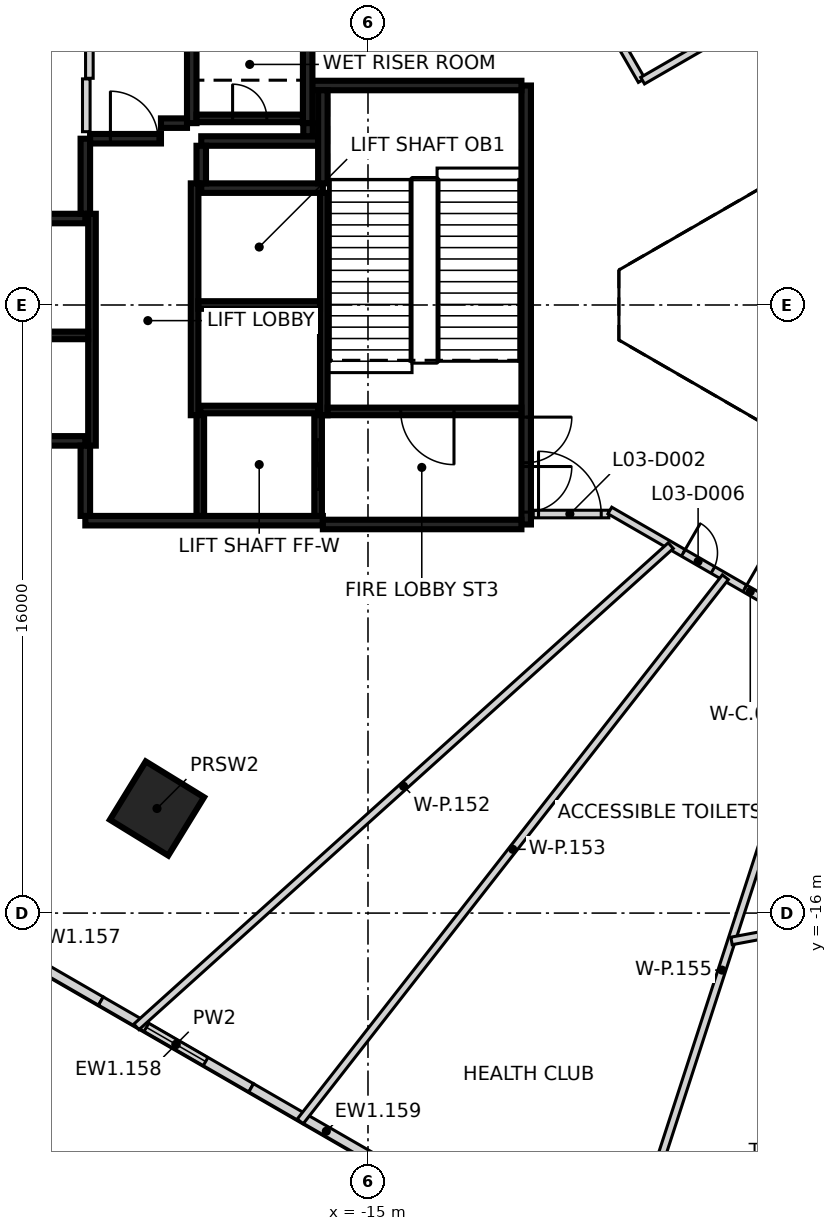
"""IFC4 building model, lengths in metres.
Left out: names, types, materials, properties, quantities, classifications, styles, units other than length and angle.
Written with IfcOpenShell. Run it as: python <this file> out.ifc"""

import sys

from ifc_helpers import new_model, si_unit, direction, frame, frame_2d, origin, origin_2d, place, context, subcontext, project, spatial, rectangle, extrude, element, fill, save


model = new_model("IFC4")
c1 = context("Model", 3, precision=1e-05, world=origin(), true_north=direction((0.0, 1.0)))
c2 = subcontext(c1, "Body", "Model", "MODEL_VIEW")
j1 = project(units=[si_unit("LENGTHUNIT", "METRE"), si_unit("PLANEANGLEUNIT", "RADIAN")], contexts=[c1])
p1 = place(None, origin())
s1 = spatial("IfcSite", under=j1, at=p1, CompositionType="ELEMENT")
p2 = place(p1, origin())
s2 = spatial("IfcBuilding", under=s1, at=p2, CompositionType="ELEMENT")
p3 = place(p2, frame((0.0, 0.0, 19.5)))
s3 = spatial("IfcBuildingStorey", under=s2, at=p3, CompositionType="ELEMENT", Elevation=19.5)
p4 = place(p3, frame((-20.552, -13.248, -0.35), z_axis=(0.0, 0.0, 1.0), x_axis=(0.523429826947, 0.85206878611, 0.0)))
e1 = element("IfcColumn", 1, at=p4, inside=s3, PredefinedType="COLUMN", context=c2, shape_type="SweptSolid", body=[
    extrude(rectangle(XDim=1.8, YDim=1.8, at=origin_2d()), origin(), (0.0, 0.0, 1.0), 2.5),
])
p5 = place(p3, frame((-22.028, -18.314, 0.0), z_axis=(0.0, 0.0, 1.0), x_axis=(-0.866023543838, 0.500003221507, 0.0)))
e2 = element("IfcWall", 2, at=p5, inside=s3, PredefinedType="SOLIDWALL", context=c2, shape_type="SweptSolid", body=[
    extrude(rectangle(XDim=4.566, YDim=0.25, at=frame_2d((2.283, 0.0))), origin(), (0.0, 0.0, 1.0), 4.55),
])
p6 = place(p3, frame((-18.074, -20.598, 0.0), z_axis=(0.0, 0.0, 1.0), x_axis=(-0.866010176527, 0.500026373457, 0.0)))
e3 = element("IfcWall", 3, at=p6, inside=s3, PredefinedType="SOLIDWALL", context=c2, shape_type="SweptSolid", body=[
    extrude(rectangle(XDim=4.566, YDim=0.25, at=frame_2d((2.283, 0.0))), origin(), (0.0, 0.0, 1.0), 4.55),
])
p7 = place(p6, frame((1.383, 0.0, 1.1)))
e4 = element("IfcOpeningElement", 4, at=p7, cuts=e3, PredefinedType="OPENING", context=c2, shape_type="SweptSolid", body=[
    extrude(rectangle(XDim=1.8, YDim=1.5, at=frame_2d((0.9, 0.75))), frame((0.0, 0.135, 0.0), z_axis=(0.0, -1.0, 0.0), x_axis=(1.0, 0.0, 0.0)), (0.0, 0.0, 1.0), 0.27),
])
p8 = place(p3, frame((-14.119, -22.881, 0.0), z_axis=(0.0, 0.0, 1.0), x_axis=(-0.866023543838, 0.500003221507, 0.0)))
e5 = element("IfcWall", 5, at=p8, inside=s3, PredefinedType="SOLIDWALL", context=c2, shape_type="SweptSolid", body=[
    extrude(rectangle(XDim=4.566, YDim=0.25, at=frame_2d((2.283, 0.0))), origin(), (0.0, 0.0, 1.0), 4.55),
])
p9 = place(p3, frame((-10.837, 5.775, 0.0), z_axis=(0.0, 0.0, 1.0), x_axis=(0.0, -1.0, 0.0)))
e6 = element("IfcWall", 6, at=p9, inside=s3, PredefinedType="SHEAR", context=c2, shape_type="SweptSolid", body=[
    extrude(rectangle(XDim=11.55, YDim=0.25, at=frame_2d((5.775, 0.0))), origin(), (0.0, 0.0, 1.0), 4.55),
])
p10 = place(p9, frame((10.025, 0.0, 0.0)))
e7 = element("IfcOpeningElement", 7, at=p10, cuts=e6, PredefinedType="OPENING", context=c2, shape_type="SweptSolid", body=[
    extrude(rectangle(XDim=1.2, YDim=2.1, at=frame_2d((0.6, 1.05))), frame((0.0, 0.135, 0.0), z_axis=(0.0, -1.0, 0.0), x_axis=(1.0, 0.0, 0.0)), (0.0, 0.0, 1.0), 0.27),
])
p11 = place(p9, frame((8.725, 0.0, 0.0)))
e8 = element("IfcOpeningElement", 8, at=p11, cuts=e6, PredefinedType="OPENING", context=c2, shape_type="SweptSolid", body=[
    extrude(rectangle(XDim=1.2, YDim=2.1, at=frame_2d((0.6, 1.05))), frame((0.0, 0.135, 0.0), z_axis=(0.0, -1.0, 0.0), x_axis=(1.0, 0.0, 0.0)), (0.0, 0.0, 1.0), 0.27),
])
p12 = place(p3, frame((-16.187, -5.675, 0.0), z_axis=(0.0, 0.0, 1.0), x_axis=(-1.0, 0.0, 0.0)))
e9 = element("IfcWall", 9, at=p12, inside=s3, PredefinedType="SHEAR", context=c2, shape_type="SweptSolid", body=[
    extrude(rectangle(XDim=6.25, YDim=0.25, at=frame_2d((3.125, 0.0))), origin(), (0.0, 0.0, 1.0), 4.55),
])
p13 = place(p3, frame((-10.963, -5.775, 0.0), z_axis=(0.0, 0.0, 1.0), x_axis=(-1.0, 0.0, 0.0)))
e10 = element("IfcWall", 10, at=p13, inside=s3, PredefinedType="SHEAR", context=c2, shape_type="SweptSolid", body=[
    extrude(rectangle(XDim=5.225, YDim=0.25, at=frame_2d((2.612, 0.0))), origin(), (0.0, 0.0, 1.0), 4.55),
])
p14 = place(p3, frame((-16.472, 5.775, 0.0), z_axis=(0.0, 0.0, 1.0), x_axis=(1.0, 0.0, 0.0)))
e11 = element("IfcWall", 11, at=p14, inside=s3, PredefinedType="SHEAR", context=c2, shape_type="SweptSolid", body=[
    extrude(rectangle(XDim=5.51, YDim=0.25, at=frame_2d((2.755, 0.0))), origin(), (0.0, 0.0, 1.0), 4.55),
])
p15 = place(p3, frame((-19.387, 3.075, 0.0), z_axis=(0.0, 0.0, 1.0), x_axis=(1.0, 0.0, 0.0)))
e12 = element("IfcWall", 12, at=p15, inside=s3, PredefinedType="SHEAR", context=c2, shape_type="SweptSolid", body=[
    extrude(rectangle(XDim=3.2, YDim=0.25, at=frame_2d((1.6, 0.0))), origin(), (0.0, 0.0, 1.0), 4.55),
])
for number, where, z_axis, x_axis in (
    (13, (-22.437, -3.575, 0.0), (0.0, 0.0, 1.0), (-1.0, 0.0, 0.0)),
    (14, (-25.412, 2.275, 0.0), (0.0, 0.0, 1.0), (1.0, 0.0, 0.0)),
):
    element("IfcWall", number, at=place(p3, frame(where, z_axis=z_axis, x_axis=x_axis)), inside=s3, PredefinedType="SHEAR", context=c2, shape_type="SweptSolid", body=[
        extrude(rectangle(XDim=2.975, YDim=0.25, at=frame_2d((1.487, 0.0))), origin(), (0.0, 0.0, 1.0), 4.55),
    ])
for number, where, z_axis, x_axis in (
    (15, (-16.587, 7.65, 0.0), (0.0, 0.0, 1.0), (0.0, -1.0, 0.0)),
    (16, (-19.637, 4.785, 0.0), (0.0, 0.0, 1.0), (0.0, 1.0, 0.0)),
):
    element("IfcWall", number, at=place(p3, frame(where, z_axis=z_axis, x_axis=x_axis)), inside=s3, PredefinedType="SHEAR", context=c2, shape_type="SweptSolid", body=[
        extrude(rectangle(XDim=2.865, YDim=0.25, at=frame_2d((1.432, 0.0))), origin(), (0.0, 0.0, 1.0), 4.55),
    ])
p16 = place(p3, frame((-16.302, 4.315, 0.0), z_axis=(0.0, 0.0, 1.0), x_axis=(-1.0, 0.0, 0.0)))
e17 = element("IfcWall", 17, at=p16, inside=s3, PredefinedType="SHEAR", context=c2, shape_type="SweptSolid", body=[
    extrude(rectangle(XDim=3.085, YDim=0.25, at=frame_2d((1.542, 0.0))), origin(), (0.0, 0.0, 1.0), 4.55),
])
p17 = place(p3, frame((-16.187, 3.2, 0.0), z_axis=(0.0, 0.0, 1.0), x_axis=(0.0, 1.0, 0.0)))
e18 = element("IfcWall", 18, at=p17, inside=s3, PredefinedType="SHEAR", context=c2, shape_type="SweptSolid", body=[
    extrude(rectangle(XDim=2.449, YDim=0.25, at=frame_2d((1.225, 0.0))), origin(), (0.0, 0.0, 1.0), 4.55),
])
p18 = place(p3, frame((-22.437, 2.4, 0.0), z_axis=(0.0, 0.0, 1.0), x_axis=(0.0, 1.0, 0.0)))
e19 = element("IfcWall", 19, at=p18, inside=s3, PredefinedType="SHEAR", context=c2, shape_type="SweptSolid", body=[
    extrude(rectangle(XDim=1.975, YDim=0.25, at=frame_2d((0.987, 0.0))), origin(), (0.0, 0.0, 1.0), 4.55),
])
p19 = place(p3, frame((-22.437, -5.55, 0.0), z_axis=(0.0, 0.0, 1.0), x_axis=(0.0, 1.0, 0.0)))
e20 = element("IfcWall", 20, at=p19, inside=s3, PredefinedType="SHEAR", context=c2, shape_type="SweptSolid", body=[
    extrude(rectangle(XDim=1.849, YDim=0.25, at=frame_2d((0.925, 0.0))), origin(), (0.0, 0.0, 1.0), 4.55),
])
p20 = place(p3, frame((-22.312, 4.375, 0.0), z_axis=(0.0, 0.0, 1.0), x_axis=(1.0, 0.0, 0.0)))
e21 = element("IfcWall", 21, at=p20, inside=s3, PredefinedType="SHEAR", context=c2, shape_type="SweptSolid", body=[
    extrude(rectangle(XDim=1.865, YDim=0.25, at=frame_2d((0.932, 0.0))), origin(), (0.0, 0.0, 1.0), 4.55),
])
p21 = place(p20, frame((0.535, 0.0, 0.0)))
e22 = element("IfcOpeningElement", 22, at=p21, cuts=e21, PredefinedType="OPENING", context=c2, shape_type="SweptSolid", body=[
    extrude(rectangle(XDim=1.25, YDim=2.1, at=frame_2d((0.625, 1.05))), frame((0.0, 0.135, 0.0), z_axis=(0.0, -1.0, 0.0), x_axis=(1.0, 0.0, 0.0)), (0.0, 0.0, 1.0), 0.27),
])
p22 = place(p3, frame((-19.387, 4.19, 0.0), z_axis=(0.0, 0.0, 1.0), x_axis=(0.0, -1.0, 0.0)))
e23 = element("IfcWall", 23, at=p22, inside=s3, PredefinedType="SHEAR", context=c2, shape_type="SweptSolid", body=[
    extrude(rectangle(XDim=0.989, YDim=0.25, at=frame_2d((0.495, 0.0))), origin(), (0.0, 0.0, 1.0), 4.55),
])
p23 = place(p3, frame((-20.447, 4.785, 0.0), z_axis=(0.0, 0.0, 1.0), x_axis=(1.0, 0.0, 0.0)))
e24 = element("IfcWall", 24, at=p23, inside=s3, PredefinedType="SHEAR", context=c2, shape_type="SweptSolid", body=[
    extrude(rectangle(XDim=0.685, YDim=0.25, at=frame_2d((0.342, 0.0))), origin(), (0.0, 0.0, 1.0), 4.55),
])
p24 = place(p3, frame((-16.577, 4.785, 0.0), z_axis=(0.0, 0.0, 1.0), x_axis=(0.0, -1.0, 0.0)))
e25 = element("IfcWall", 25, at=p24, inside=s3, PredefinedType="SHEAR", context=c2, shape_type="SweptSolid", body=[
    extrude(rectangle(XDim=0.344, YDim=0.25, at=frame_2d((0.172, 0.0))), origin(), (0.0, 0.0, 1.0), 4.55),
])
p25 = place(p3, frame((-16.162, 2.951, 0.0), z_axis=(0.0, 0.0, 1.0), x_axis=(0.0, -1.0, 0.0)))
e26 = element("IfcWall", 26, at=p25, inside=s3, PredefinedType="SHEAR", context=c2, shape_type="SweptSolid", body=[
    extrude(rectangle(XDim=5.851, YDim=0.2, at=frame_2d((2.925, 0.0))), origin(), (0.0, 0.0, 1.0), 4.55),
])
for number, where, z_axis, x_axis in (
    (27, (-19.562, -2.9, 0.0), (0.0, 0.0, 1.0), (0.0, 1.0, 0.0)),
    (28, (-22.262, 2.4, 0.0), (0.0, 0.0, 1.0), (0.0, -1.0, 0.0)),
):
    element("IfcWall", number, at=place(p3, frame(where, z_axis=z_axis, x_axis=x_axis)), inside=s3, PredefinedType="SHEAR", context=c2, shape_type="SweptSolid", body=[
        extrude(rectangle(XDim=6.1, YDim=0.2, at=frame_2d((3.05, 0.0))), origin(), (0.0, 0.0, 1.0), 4.55),
    ])
p26 = place(p3, frame((-10.963, -2.8, 0.0), z_axis=(0.0, 0.0, 1.0), x_axis=(-1.0, 0.0, 0.0)))
e29 = element("IfcWall", 29, at=p26, inside=s3, PredefinedType="SHEAR", context=c2, shape_type="SweptSolid", body=[
    extrude(rectangle(XDim=5.098, YDim=0.2, at=frame_2d((2.549, 0.0))), origin(), (0.0, 0.0, 1.0), 4.55),
])
p27 = place(p26, frame((1.774, 0.0, 0.0)))
e30 = element("IfcOpeningElement", 30, at=p27, cuts=e29, PredefinedType="OPENING", context=c2, shape_type="SweptSolid", body=[
    extrude(rectangle(XDim=1.4, YDim=2.1, at=frame_2d((0.7, 1.05))), frame((0.0, 0.11, 0.0), z_axis=(0.0, -1.0, 0.0), x_axis=(1.0, 0.0, 0.0)), (0.0, 0.0, 1.0), 0.22),
])
p28 = place(p3, frame((-16.263, 0.0, 0.0), z_axis=(0.0, 0.0, 1.0), x_axis=(-1.0, 0.0, 0.0)))
e31 = element("IfcWall", 31, at=p28, inside=s3, PredefinedType="SHEAR", context=c2, shape_type="SweptSolid", body=[
    extrude(rectangle(XDim=3.198, YDim=0.2, at=frame_2d((1.599, 0.0))), origin(), (0.0, 0.0, 1.0), 4.55),
])
p29 = place(p3, frame((-22.363, -0.8, 0.0), z_axis=(0.0, 0.0, 1.0), x_axis=(-1.0, 0.0, 0.0)))
e32 = element("IfcWall", 32, at=p29, inside=s3, PredefinedType="SHEAR", context=c2, shape_type="SweptSolid", body=[
    extrude(rectangle(XDim=3.048, YDim=0.2, at=frame_2d((1.524, 0.0))), origin(), (0.0, 0.0, 1.0), 4.55),
])
p30 = place(p3, frame((-19.511, 4.91, 0.0), z_axis=(0.0, 0.0, 1.0), x_axis=(1.0, 0.0, 0.0)))
e33 = element("IfcWall", 33, at=p30, inside=s3, PredefinedType="SHEAR", context=c2, shape_type="SweptSolid", body=[
    extrude(rectangle(XDim=2.798, YDim=0.2, at=frame_2d((1.399, 0.0))), origin(), (0.0, 0.0, 1.0), 4.55),
])
p31 = place(p30, frame((0.949, 0.0, 0.0)))
e34 = element("IfcOpeningElement", 34, at=p31, cuts=e33, PredefinedType="OPENING", context=c2, shape_type="SweptSolid", body=[
    extrude(rectangle(XDim=0.9, YDim=2.1, at=frame_2d((0.45, 1.05))), frame((0.0, 0.11, 0.0), z_axis=(0.0, -1.0, 0.0), x_axis=(1.0, 0.0, 0.0)), (0.0, 0.0, 1.0), 0.22),
])
p32 = place(p3, frame((-19.412, -2.75, 0.0), z_axis=(0.0, 0.0, 1.0), x_axis=(1.0, 0.0, 0.0)))
e35 = element("IfcWall", 35, at=p32, inside=s3, PredefinedType="SHEAR", context=c2, shape_type="SweptSolid", body=[
    extrude(rectangle(XDim=3.1, YDim=0.2, at=frame_2d((1.55, 0.0))), origin(), (0.0, 0.0, 1.0), 4.55),
])
p33 = place(p3, frame((-16.312, -2.898, 0.0), z_axis=(0.0, 0.0, 1.0), x_axis=(0.0, -1.0, 0.0)))
e36 = element("IfcWall", 36, at=p33, inside=s3, PredefinedType="SHEAR", context=c2, shape_type="SweptSolid", body=[
    extrude(rectangle(XDim=2.651, YDim=0.2, at=frame_2d((1.325, 0.0))), origin(), (0.0, 0.0, 1.0), 4.55),
])
p34 = place(p33, frame((0.652, 0.0, 0.0)))
e37 = element("IfcOpeningElement", 37, at=p34, cuts=e36, PredefinedType="OPENING", context=c2, shape_type="SweptSolid", body=[
    extrude(rectangle(XDim=1.3, YDim=2.1, at=frame_2d((0.65, 1.05))), frame((0.0, 0.11, 0.0), z_axis=(0.0, -1.0, 0.0), x_axis=(1.0, 0.0, 0.0)), (0.0, 0.0, 1.0), 0.22),
])
p35 = place(p3, frame((-19.412, -5.549, 0.0), z_axis=(0.0, 0.0, 1.0), x_axis=(0.0, 1.0, 0.0)))
e38 = element("IfcWall", 38, at=p35, inside=s3, PredefinedType="SHEAR", context=c2, shape_type="SweptSolid", body=[
    extrude(rectangle(XDim=2.651, YDim=0.2, at=frame_2d((1.325, 0.0))), origin(), (0.0, 0.0, 1.0), 4.55),
])
p36 = place(p3, frame((-22.412, 4.56, 0.0), z_axis=(0.0, 0.0, 1.0), x_axis=(0.0, 1.0, 0.0)))
e39 = element("IfcWall", 39, at=p36, inside=s3, PredefinedType="PARTITIONING", context=c2, shape_type="SweptSolid", body=[
    extrude(rectangle(XDim=1.389, YDim=0.2, at=frame_2d((0.694, 0.0))), origin(), (0.0, 0.0, 1.0), 4.55),
])
p37 = place(p3, frame((-22.332, 8.156, 0.0), z_axis=(0.0, 0.0, 1.0), x_axis=(0.000445732071, -0.999999900661, 0.0)))
e40 = element("IfcWall", 40, at=p37, inside=s3, PredefinedType="PARTITIONING", context=c2, shape_type="SweptSolid", body=[
    extrude(rectangle(XDim=2.191, YDim=0.2, at=frame_2d((1.095, 0.0))), origin(), (0.0, 0.0, 1.0), 4.55),
])
p38 = place(p3, frame((-10.652, -5.5, 0.0), z_axis=(0.0, 0.0, 1.0), x_axis=(1.0, 0.0, 0.0)))
e41 = element("IfcWall", 41, at=p38, inside=s3, PredefinedType="PARTITIONING", context=c2, shape_type="SweptSolid", body=[
    extrude(rectangle(XDim=1.989, YDim=0.2, at=frame_2d((0.995, 0.0))), origin(), (0.0, 0.0, 1.0), 4.55),
])
p39 = place(p38, frame((0.139, 0.0, 0.0)))
e42 = element("IfcOpeningElement", 42, at=p39, cuts=e41, PredefinedType="OPENING", context=c2, shape_type="SweptSolid", body=[
    extrude(rectangle(XDim=1.65, YDim=2.1, at=frame_2d((0.825, 1.05))), frame((0.0, 0.11, 0.0), z_axis=(0.0, -1.0, 0.0), x_axis=(1.0, 0.0, 0.0)), (0.0, 0.0, 1.0), 0.22),
])
p40 = place(p3, frame((-8.884, 7.789, 0.0), z_axis=(0.0, 0.0, 1.0), x_axis=(0.49942731159, -0.866355793215, 0.0)))
e43 = element("IfcWall", 43, at=p40, inside=s3, PredefinedType="PARTITIONING", context=c2, shape_type="SweptSolid", body=[
    extrude(rectangle(XDim=2.172, YDim=0.2, at=frame_2d((1.086, 0.0))), origin(), (0.0, 0.0, 1.0), 4.55),
])
p41 = place(p3, frame((-8.636, -5.407, 0.0), z_axis=(0.0, 0.0, 1.0), x_axis=(0.86608314541, -0.499899975231, 0.0)))
e44 = element("IfcWall", 44, at=p41, inside=s3, PredefinedType="PARTITIONING", context=c2, shape_type="SweptSolid", body=[
    extrude(rectangle(XDim=8.532, YDim=0.2, at=frame_2d((4.266, 0.0))), origin(), (0.0, 0.0, 1.0), 4.55),
])
p42 = place(p41, frame((2.231, 0.0, 0.0)))
e45 = element("IfcOpeningElement", 45, at=p42, cuts=e44, PredefinedType="OPENING", context=c2, shape_type="SweptSolid", body=[
    extrude(rectangle(XDim=0.9, YDim=2.1, at=frame_2d((0.45, 1.05))), frame((0.0, 0.11, 0.0), z_axis=(0.0, -1.0, 0.0), x_axis=(1.0, 0.0, 0.0)), (0.0, 0.0, 1.0), 0.22),
])
p43 = place(p41, frame((4.101, 0.0, 0.0)))
e46 = element("IfcOpeningElement", 46, at=p43, cuts=e44, PredefinedType="OPENING", context=c2, shape_type="SweptSolid", body=[
    extrude(rectangle(XDim=2.0, YDim=2.1, at=frame_2d((1.0, 1.05))), frame((0.0, 0.11, 0.0), z_axis=(0.0, -1.0, 0.0), x_axis=(1.0, 0.0, 0.0)), (0.0, 0.0, 1.0), 0.22),
])
p44 = place(p3, frame((-7.774, 5.903, 0.0), z_axis=(0.0, 0.0, 1.0), x_axis=(0.865984718775, 0.500070461884, 0.0)))
e47 = element("IfcWall", 47, at=p44, inside=s3, PredefinedType="PARTITIONING", context=c2, shape_type="SweptSolid", body=[
    extrude(rectangle(XDim=8.562, YDim=0.2, at=frame_2d((4.281, 0.0))), origin(), (0.0, 0.0, 1.0), 4.55),
])
p45 = place(p44, frame((5.165, 0.0, 0.0)))
e48 = element("IfcOpeningElement", 48, at=p45, cuts=e47, PredefinedType="OPENING", context=c2, shape_type="SweptSolid", body=[
    extrude(rectangle(XDim=2.0, YDim=2.1, at=frame_2d((1.0, 1.05))), frame((0.0, 0.11, 0.0), z_axis=(0.0, -1.0, 0.0), x_axis=(1.0, 0.0, 0.0)), (0.0, 0.0, 1.0), 0.22),
])
p46 = place(p3, frame((-21.094, -18.993, 0.0), z_axis=(0.0, 0.0, 1.0), x_axis=(0.743122161884, 0.669155775972, 0.0)))
e49 = element("IfcWall", 49, at=p46, inside=s3, PredefinedType="PARTITIONING", context=c2, shape_type="SweptSolid", body=[
    extrude(rectangle(XDim=18.92, YDim=0.2, at=frame_2d((9.46, 0.0))), origin(), (0.0, 0.0, 1.0), 2.15),
])
p47 = place(p3, frame((-16.783, -21.481, 0.0), z_axis=(0.0, 0.0, 1.0), x_axis=(0.615637784037, 0.788029262696, 0.0)))
e50 = element("IfcWall", 50, at=p47, inside=s3, PredefinedType="PARTITIONING", context=c2, shape_type="SweptSolid", body=[
    extrude(rectangle(XDim=18.17, YDim=0.2, at=frame_2d((9.085, 0.0))), origin(), (0.0, 0.0, 1.0), 2.15),
])
p48 = place(p3, frame((-8.528, -26.248, 0.0), z_axis=(0.0, 0.0, 1.0), x_axis=(0.308912004648, 0.951090623119, 0.0)))
e51 = element("IfcWall", 51, at=p48, inside=s3, PredefinedType="PARTITIONING", context=c2, shape_type="SweptSolid", body=[
    extrude(rectangle(XDim=18.395, YDim=0.2, at=frame_2d((9.197, 0.0))), origin(), (0.0, 0.0, 1.0), 2.15),
])
p49 = place(p3, frame((-5.435, -16.733, 0.0), z_axis=(0.0, 0.0, 1.0), x_axis=(0.982959024913, 0.183824795232, 0.0)))
e52 = element("IfcWall", 52, at=p49, inside=s3, PredefinedType="PARTITIONING", context=c2, shape_type="SweptSolid", body=[
    extrude(rectangle(XDim=3.878, YDim=0.2, at=frame_2d((1.939, 0.0))), origin(), (0.0, 0.0, 1.0), 4.55),
])
p50 = place(p7, origin())
e53 = element("IfcWindow", 53, at=p50, inside=s3, PartitioningType="SINGLE_PANEL", PredefinedType="WINDOW", context=c2, shape_type="SweptSolid", body=[
    extrude(rectangle(XDim=1.8, YDim=1.5, at=frame_2d((0.9, 0.75))), frame((0.0, 0.03, 0.0), z_axis=(0.0, -1.0, 0.0), x_axis=(1.0, 0.0, 0.0)), (0.0, 0.0, 1.0), 0.06),
])
fill(e4, e53)
p51 = place(p34, origin())
e54 = element("IfcDoor", 54, at=p51, inside=s3, OperationType="SLIDING_TO_RIGHT", PredefinedType="DOOR", context=c2, shape_type="SweptSolid", body=[
    extrude(rectangle(XDim=1.3, YDim=2.1, at=frame_2d((0.65, 1.05))), frame((0.0, 0.025, 0.0), z_axis=(0.0, -1.0, 0.0), x_axis=(1.0, 0.0, 0.0)), (0.0, 0.0, 1.0), 0.05),
])
fill(e37, e54)
p52 = place(p21, origin())
e55 = element("IfcDoor", 55, at=p52, inside=s3, OperationType="SINGLE_SWING_LEFT", PredefinedType="DOOR", context=c2, shape_type="SweptSolid", body=[
    extrude(rectangle(XDim=1.25, YDim=2.1, at=frame_2d((0.625, 1.05))), frame((0.0, 0.025, 0.0), z_axis=(0.0, -1.0, 0.0), x_axis=(1.0, 0.0, 0.0)), (0.0, 0.0, 1.0), 0.05),
])
fill(e22, e55)
p53 = place(p10, origin())
e56 = element("IfcDoor", 56, at=p53, inside=s3, OperationType="SINGLE_SWING_LEFT", PredefinedType="DOOR", context=c2, shape_type="SweptSolid", body=[
    extrude(rectangle(XDim=1.2, YDim=2.1, at=frame_2d((0.6, 1.05))), frame((0.0, 0.025, 0.0), z_axis=(0.0, -1.0, 0.0), x_axis=(1.0, 0.0, 0.0)), (0.0, 0.0, 1.0), 0.05),
])
fill(e7, e56)
p54 = place(p11, origin())
e57 = element("IfcDoor", 57, at=p54, inside=s3, OperationType="SINGLE_SWING_RIGHT", PredefinedType="DOOR", context=c2, shape_type="SweptSolid", body=[
    extrude(rectangle(XDim=1.2, YDim=2.1, at=frame_2d((0.6, 1.05))), frame((0.0, 0.025, 0.0), z_axis=(0.0, -1.0, 0.0), x_axis=(1.0, 0.0, 0.0)), (0.0, 0.0, 1.0), 0.05),
])
fill(e8, e57)
p55 = place(p27, origin())
e58 = element("IfcDoor", 58, at=p55, inside=s3, OperationType="SINGLE_SWING_RIGHT", PredefinedType="DOOR", context=c2, shape_type="SweptSolid", body=[
    extrude(rectangle(XDim=1.4, YDim=2.1, at=frame_2d((0.7, 1.05))), frame((0.0, 0.025, 0.0), z_axis=(0.0, -1.0, 0.0), x_axis=(1.0, 0.0, 0.0)), (0.0, 0.0, 1.0), 0.05),
])
fill(e30, e58)
p56 = place(p31, origin())
e59 = element("IfcDoor", 59, at=p56, inside=s3, OperationType="SINGLE_SWING_LEFT", PredefinedType="DOOR", context=c2, shape_type="SweptSolid", body=[
    extrude(rectangle(XDim=0.9, YDim=2.1, at=frame_2d((0.45, 1.05))), frame((0.0, 0.025, 0.0), z_axis=(0.0, -1.0, 0.0), x_axis=(1.0, 0.0, 0.0)), (0.0, 0.0, 1.0), 0.05),
])
fill(e34, e59)
p57 = place(p39, origin())
e60 = element("IfcDoor", 60, at=p57, inside=s3, OperationType="DOUBLE_DOOR_SINGLE_SWING", PredefinedType="DOOR", context=c2, shape_type="SweptSolid", body=[
    extrude(rectangle(XDim=1.65, YDim=2.1, at=frame_2d((0.825, 1.05))), frame((0.0, 0.025, 0.0), z_axis=(0.0, -1.0, 0.0), x_axis=(1.0, 0.0, 0.0)), (0.0, 0.0, 1.0), 0.05),
])
fill(e42, e60)
p58 = place(p42, frame((0.9, 0.0, 0.0), z_axis=(0.0, 0.0, 1.0), x_axis=(-1.0, 0.0, 0.0)))
e61 = element("IfcDoor", 61, at=p58, inside=s3, OperationType="SINGLE_SWING_LEFT", PredefinedType="DOOR", context=c2, shape_type="SweptSolid", body=[
    extrude(rectangle(XDim=0.9, YDim=2.1, at=frame_2d((0.45, 1.05))), frame((0.0, 0.025, 0.0), z_axis=(0.0, -1.0, 0.0), x_axis=(1.0, 0.0, 0.0)), (0.0, 0.0, 1.0), 0.05),
])
fill(e45, e61)
p59 = place(p43, frame((2.0, 0.0, 0.0), z_axis=(0.0, 0.0, 1.0), x_axis=(-1.0, 0.0, 0.0)))
e62 = element("IfcDoor", 62, at=p59, inside=s3, OperationType="DOUBLE_DOOR_SINGLE_SWING", PredefinedType="DOOR", context=c2, shape_type="SweptSolid", body=[
    extrude(rectangle(XDim=2.0, YDim=2.1, at=frame_2d((1.0, 1.05))), frame((0.0, 0.025, 0.0), z_axis=(0.0, -1.0, 0.0), x_axis=(1.0, 0.0, 0.0)), (0.0, 0.0, 1.0), 0.05),
])
fill(e46, e62)
save(model, sys.argv[1])
